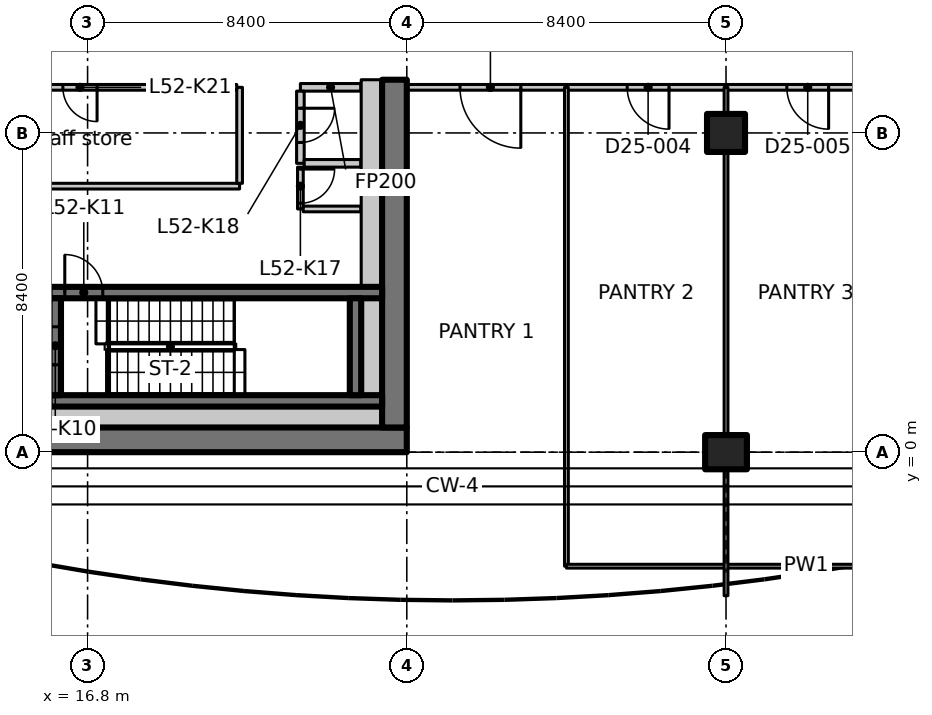
"""IFC4 building model, lengths in metres.
Left out: names, types, materials, properties, quantities, classifications, styles, units other than length and angle.
Written with IfcOpenShell. Run it as: python <this file> out.ifc"""

import sys

from ifc_helpers import new_model, si_unit, direction, frame, frame_2d, origin, origin_2d, place, context, subcontext, project, spatial, polyline, rectangle, outline, extrude, element, fill, save


model = new_model("IFC4")
c1 = context("Model", 3, precision=1e-05, world=origin(), true_north=direction((0.0, 1.0)))
c2 = subcontext(c1, "Body", "Model", "MODEL_VIEW")
j1 = project(units=[si_unit("LENGTHUNIT", "METRE"), si_unit("PLANEANGLEUNIT", "RADIAN")], contexts=[c1])
p1 = place(None, origin())
s1 = spatial("IfcSite", under=j1, at=p1, CompositionType="ELEMENT")
p2 = place(p1, origin())
s2 = spatial("IfcBuilding", under=s1, at=p2, CompositionType="ELEMENT")
p3 = place(p2, frame((0.0, 0.0, 206.4)))
s3 = spatial("IfcBuildingStorey", under=s2, at=p3, CompositionType="ELEMENT", Elevation=206.4)
p4 = place(p3, frame((33.6, 0.0, 0.0), z_axis=(0.0, 0.0, 1.0), x_axis=(0.0, 1.0, 0.0)))
e1 = element("IfcColumn", 1, at=p4, inside=s3, PredefinedType="COLUMN", context=c2, shape_type="SweptSolid", body=[
    extrude(rectangle(XDim=0.9, YDim=1.1, at=origin_2d()), origin(), (0.0, 0.0, 1.0), 4.2),
])
p5 = place(p3, frame((33.6, 8.4, 0.0), z_axis=(0.0, 0.0, 1.0), x_axis=(1.0, 0.0, 0.0)))
e2 = element("IfcColumn", 2, at=p5, inside=s3, PredefinedType="COLUMN", context=c2, shape_type="SweptSolid", body=[
    extrude(rectangle(XDim=1.0, YDim=1.0, at=origin_2d()), origin(), (0.0, 0.0, 1.0), 4.2),
])
p6 = place(p3, frame((7.286, 0.325, 0.0), z_axis=(0.0, 0.0, 1.0), x_axis=(1.0, 0.0, 0.0)))
e3 = element("IfcWall", 3, at=p6, inside=s3, PredefinedType="SHEAR", context=c2, shape_type="SweptSolid", body=[
    extrude(rectangle(XDim=17.914, YDim=0.65, at=frame_2d((8.957, 0.0))), origin(), (0.0, 0.0, 1.0), 4.2),
])
p7 = place(p3, frame((24.875, 0.65, 0.0), z_axis=(0.0, 0.0, 1.0), x_axis=(0.0, 1.0, 0.0)))
e4 = element("IfcWall", 4, at=p7, inside=s3, PredefinedType="SHEAR", context=c2, shape_type="SweptSolid", body=[
    extrude(rectangle(XDim=9.15, YDim=0.65, at=frame_2d((4.575, 0.0))), origin(), (0.0, 0.0, 1.0), 4.2),
])
p8 = place(p3, frame((15.8, 1.35, 0.0), z_axis=(0.0, 0.0, 1.0), x_axis=(1.0, 0.0, 0.0)))
e5 = element("IfcWall", 5, at=p8, inside=s3, PredefinedType="SHEAR", context=c2, shape_type="SweptSolid", body=[
    extrude(rectangle(XDim=8.75, YDim=0.3, at=frame_2d((4.375, 0.0))), origin(), (0.0, 0.0, 1.0), 4.2),
])
p9 = place(p3, frame((15.8, 4.2, 0.0), z_axis=(0.0, 0.0, 1.0), x_axis=(1.0, 0.0, 0.0)))
e6 = element("IfcWall", 6, at=p9, inside=s3, PredefinedType="SHEAR", context=c2, shape_type="SweptSolid", body=[
    extrude(rectangle(XDim=8.75, YDim=0.3, at=frame_2d((4.375, 0.0))), origin(), (0.0, 0.0, 1.0), 4.2),
])
p10 = place(p9, frame((0.4, 0.0, 0.0)))
e7 = element("IfcOpeningElement", 7, at=p10, cuts=e6, PredefinedType="OPENING", context=c2, shape_type="SweptSolid", body=[
    extrude(rectangle(XDim=1.0, YDim=2.1, at=frame_2d((0.5, 1.05))), frame((0.0, 0.16, 0.0), z_axis=(0.0, -1.0, 0.0), x_axis=(1.0, 0.0, 0.0)), (0.0, 0.0, 1.0), 0.32),
])
p11 = place(p3, frame((15.95, 1.5, 0.0), z_axis=(0.0, 0.0, 1.0), x_axis=(0.0, 1.0, 0.0)))
e8 = element("IfcWall", 8, at=p11, inside=s3, PredefinedType="SHEAR", context=c2, shape_type="SweptSolid", body=[
    extrude(rectangle(XDim=2.55, YDim=0.3, at=frame_2d((1.275, 0.0))), origin(), (0.0, 0.0, 1.0), 4.2),
])
p12 = place(p11, frame((0.8, 0.0, 0.0)))
e9 = element("IfcOpeningElement", 9, at=p12, cuts=e8, PredefinedType="OPENING", context=c2, shape_type="SweptSolid", body=[
    extrude(rectangle(XDim=1.0, YDim=2.1, at=frame_2d((0.5, 1.05))), frame((0.0, 0.16, 0.0), z_axis=(0.0, -1.0, 0.0), x_axis=(1.0, 0.0, 0.0)), (0.0, 0.0, 1.0), 0.32),
])
p13 = place(p3, frame((23.85, 1.5, 0.0), z_axis=(0.0, 0.0, 1.0), x_axis=(0.0, 1.0, 0.0)))
e10 = element("IfcWall", 10, at=p13, inside=s3, PredefinedType="SHEAR", context=c2, shape_type="SweptSolid", body=[
    extrude(rectangle(XDim=2.55, YDim=0.3, at=frame_2d((1.275, 0.0))), origin(), (0.0, 0.0, 1.0), 4.2),
])
p14 = place(p3, frame((23.988, 9.6, 0.0), z_axis=(0.0, 0.0, 1.0), x_axis=(-1.0, 0.0, 0.0)))
e11 = element("IfcWall", 11, at=p14, inside=s3, PredefinedType="PARTITIONING", context=c2, shape_type="SweptSolid", body=[
    extrude(rectangle(XDim=1.588, YDim=0.2, at=frame_2d((0.794, 0.0))), origin(), (0.0, 0.0, 1.0), 4.2),
])
p15 = place(p3, frame((22.4, 9.5, 0.0), z_axis=(0.0, 0.0, 1.0), x_axis=(0.0, -1.0, 0.0)))
e12 = element("IfcWall", 12, at=p15, inside=s3, PredefinedType="PARTITIONING", context=c2, shape_type="SweptSolid", body=[
    extrude(rectangle(XDim=1.9, YDim=0.2, at=frame_2d((0.95, 0.0))), origin(), (0.0, 0.0, 1.0), 4.2),
])
p16 = place(p15, frame((0.45, 0.0, 0.0)))
e13 = element("IfcOpeningElement", 13, at=p16, cuts=e12, PredefinedType="OPENING", context=c2, shape_type="SweptSolid", body=[
    extrude(rectangle(XDim=0.9, YDim=2.1, at=frame_2d((0.45, 1.05))), frame((0.0, 0.11, 0.0), z_axis=(0.0, -1.0, 0.0), x_axis=(1.0, 0.0, 0.0)), (0.0, 0.0, 1.0), 0.22),
])
p17 = place(p3, frame((22.5, 7.6, 0.0), z_axis=(0.0, 0.0, 1.0), x_axis=(1.0, 0.0, 0.0)))
e14 = element("IfcWall", 14, at=p17, inside=s3, PredefinedType="PARTITIONING", context=c2, shape_type="SweptSolid", body=[
    extrude(rectangle(XDim=1.488, YDim=0.2, at=frame_2d((0.744, 0.0))), origin(), (0.0, 0.0, 1.0), 4.2),
])
p18 = place(p3, frame((12.5, 7.0, 0.0), z_axis=(0.0, 0.0, 1.0), x_axis=(1.0, 0.0, 0.0)))
e15 = element("IfcWall", 15, at=p18, inside=s3, PredefinedType="PARTITIONING", context=c2, shape_type="SweptSolid", body=[
    extrude(rectangle(XDim=8.3, YDim=0.15, at=frame_2d((4.15, 0.0))), origin(), (0.0, 0.0, 1.0), 4.2),
])
p19 = place(p3, frame((20.8, 7.075, 0.0), z_axis=(0.0, 0.0, 1.0), x_axis=(0.0, 1.0, 0.0)))
e16 = element("IfcWall", 16, at=p19, inside=s3, PredefinedType="PARTITIONING", context=c2, shape_type="SweptSolid", body=[
    extrude(rectangle(XDim=2.525, YDim=0.15, at=frame_2d((1.263, 0.0))), origin(), (0.0, 0.0, 1.0), 4.2),
])
p20 = place(p3, frame((20.725, 9.6, 0.0), z_axis=(0.0, 0.0, 1.0), x_axis=(-1.0, 0.0, 0.0)))
e17 = element("IfcWall", 17, at=p20, inside=s3, PredefinedType="PARTITIONING", context=c2, shape_type="SweptSolid", body=[
    extrude(rectangle(XDim=8.225, YDim=0.15, at=frame_2d((4.113, 0.0))), origin(), (0.0, 0.0, 1.0), 4.2),
])
p21 = place(p20, frame((3.675, 0.0, 0.0)))
e18 = element("IfcOpeningElement", 18, at=p21, cuts=e17, PredefinedType="OPENING", context=c2, shape_type="SweptSolid", body=[
    extrude(rectangle(XDim=0.9, YDim=2.1, at=frame_2d((0.45, 1.05))), frame((0.0, 0.085, 0.0), z_axis=(0.0, -1.0, 0.0), x_axis=(1.0, 0.0, 0.0)), (0.0, 0.0, 1.0), 0.17),
])
p22 = place(p3, frame((22.4, 7.5, 0.0), z_axis=(0.0, 0.0, 1.0), x_axis=(0.0, -1.0, 0.0)))
e19 = element("IfcWall", 19, at=p22, inside=s3, PredefinedType="PARTITIONING", context=c2, shape_type="SweptSolid", body=[
    extrude(rectangle(XDim=1.1, YDim=0.15, at=frame_2d((0.55, 0.0))), origin(), (0.0, 0.0, 1.0), 4.2),
])
p23 = place(p22, frame((0.05, 0.0, 0.0)))
e20 = element("IfcOpeningElement", 20, at=p23, cuts=e19, PredefinedType="OPENING", context=c2, shape_type="SweptSolid", body=[
    extrude(rectangle(XDim=0.9, YDim=2.1, at=frame_2d((0.45, 1.05))), frame((0.0, 0.085, 0.0), z_axis=(0.0, -1.0, 0.0), x_axis=(1.0, 0.0, 0.0)), (0.0, 0.0, 1.0), 0.17),
])
p24 = place(p3, frame((22.475, 6.4, 0.0), z_axis=(0.0, 0.0, 1.0), x_axis=(1.0, 0.0, 0.0)))
e21 = element("IfcWall", 21, at=p24, inside=s3, PredefinedType="PARTITIONING", context=c2, shape_type="SweptSolid", body=[
    extrude(rectangle(XDim=1.513, YDim=0.15, at=frame_2d((0.756, 0.0))), origin(), (0.0, 0.0, 1.0), 4.2),
])
p25 = place(p3, frame((13.35, 0.925, 0.0), z_axis=(0.0, 0.0, 1.0), x_axis=(1.0, 0.0, 0.0)))
e22 = element("IfcWall", 22, at=p25, inside=s3, PredefinedType="PARTITIONING", context=c2, shape_type="SweptSolid", body=[
    extrude(rectangle(XDim=11.2, YDim=0.55, at=frame_2d((5.6, 0.0))), origin(), (0.0, 0.0, 1.0), 4.2),
])
p26 = place(p3, frame((24.275, 1.5, 0.0), z_axis=(0.0, 0.0, 1.0), x_axis=(0.0, 1.0, 0.0)))
e23 = element("IfcWall", 23, at=p26, inside=s3, PredefinedType="PARTITIONING", context=c2, shape_type="SweptSolid", body=[
    extrude(rectangle(XDim=2.55, YDim=0.55, at=frame_2d((1.275, 0.0))), origin(), (0.0, 0.0, 1.0), 4.2),
])
p27 = place(p3, frame((24.275, 4.35, 0.0), z_axis=(0.0, 0.0, 1.0), x_axis=(0.0, 1.0, 0.0)))
e24 = element("IfcWall", 24, at=p27, inside=s3, PredefinedType="PARTITIONING", context=c2, shape_type="SweptSolid", body=[
    extrude(rectangle(XDim=5.45, YDim=0.55, at=frame_2d((2.725, 0.0))), origin(), (0.0, 0.0, 1.0), 4.2),
])
p28 = place(p3, frame((29.4, 9.6, 0.0), z_axis=(0.0, 0.0, 1.0), x_axis=(-1.0, 0.0, 0.0)))
e25 = element("IfcWall", 25, at=p28, inside=s3, PredefinedType="PARTITIONING", context=c2, shape_type="SweptSolid", body=[
    extrude(rectangle(XDim=4.2, YDim=0.15, at=frame_2d((2.1, 0.0))), origin(), (0.0, 0.0, 1.0), 4.18),
])
p29 = place(p28, frame((1.2, 0.0, 0.0)))
e26 = element("IfcOpeningElement", 26, at=p29, cuts=e25, PredefinedType="OPENING", context=c2, shape_type="SweptSolid", body=[
    extrude(rectangle(XDim=1.6, YDim=2.1, at=frame_2d((0.8, 1.05))), frame((0.0, 0.085, 0.0), z_axis=(0.0, -1.0, 0.0), x_axis=(1.0, 0.0, 0.0)), (0.0, 0.0, 1.0), 0.17),
])
p30 = place(p3, frame((33.6, 9.6, 0.0), z_axis=(0.0, 0.0, 1.0), x_axis=(-1.0, 0.0, 0.0)))
e27 = element("IfcWall", 27, at=p30, inside=s3, PredefinedType="PARTITIONING", context=c2, shape_type="SweptSolid", body=[
    extrude(rectangle(XDim=4.2, YDim=0.15, at=frame_2d((2.1, 0.0))), origin(), (0.0, 0.0, 1.0), 4.18),
])
p31 = place(p30, frame((1.5, 0.0, 0.0)))
e28 = element("IfcOpeningElement", 28, at=p31, cuts=e27, PredefinedType="OPENING", context=c2, shape_type="SweptSolid", body=[
    extrude(rectangle(XDim=1.1, YDim=2.1, at=frame_2d((0.55, 1.05))), frame((0.0, 0.085, 0.0), z_axis=(0.0, -1.0, 0.0), x_axis=(1.0, 0.0, 0.0)), (0.0, 0.0, 1.0), 0.17),
])
p32 = place(p3, frame((37.8, 9.6, 0.0), z_axis=(0.0, 0.0, 1.0), x_axis=(-1.0, 0.0, 0.0)))
e29 = element("IfcWall", 29, at=p32, inside=s3, PredefinedType="PARTITIONING", context=c2, shape_type="SweptSolid", body=[
    extrude(rectangle(XDim=4.2, YDim=0.15, at=frame_2d((2.1, 0.0))), origin(), (0.0, 0.0, 1.0), 4.18),
])
p33 = place(p32, frame((1.5, 0.0, 0.0)))
e30 = element("IfcOpeningElement", 30, at=p33, cuts=e29, PredefinedType="OPENING", context=c2, shape_type="SweptSolid", body=[
    extrude(rectangle(XDim=1.1, YDim=2.1, at=frame_2d((0.55, 1.05))), frame((0.0, 0.085, 0.0), z_axis=(0.0, -1.0, 0.0), x_axis=(1.0, 0.0, 0.0)), (0.0, 0.0, 1.0), 0.17),
])
p34 = place(p3, frame((29.4, 9.6, 0.0), z_axis=(0.0, 0.0, 1.0), x_axis=(0.0, -1.0, 0.0)))
e31 = element("IfcWall", 31, at=p34, inside=s3, PredefinedType="PARTITIONING", context=c2, shape_type="SweptSolid", body=[
    extrude(outline(polyline([(0.0, 0.0), (12.6, 0.0), (12.6, 4.18), (10.05, 4.18), (10.048, 3.83), (9.152, 3.83), (9.15, 4.18), (0.0, 4.18), (0.0, 0.0)])), frame((0.0, 0.05, 0.0), z_axis=(0.0, -1.0, 0.0), x_axis=(1.0, 0.0, 0.0)), (0.0, 0.0, 1.0), 0.1),
])
p35 = place(p3, frame((29.4, -3.0, 0.0), z_axis=(0.0, 0.0, 1.0), x_axis=(1.0, 0.0, 0.0)))
e32 = element("IfcWall", 32, at=p35, inside=s3, PredefinedType="PARTITIONING", context=c2, shape_type="SweptSolid", body=[
    extrude(rectangle(XDim=4.2, YDim=0.1, at=frame_2d((2.1, 0.0))), origin(), (0.0, 0.0, 1.0), 3.83),
])
p36 = place(p3, frame((33.6, -3.0, 0.0), z_axis=(0.0, 0.0, 1.0), x_axis=(1.0, 0.0, 0.0)))
e33 = element("IfcWall", 33, at=p36, inside=s3, PredefinedType="PARTITIONING", context=c2, shape_type="SweptSolid", body=[
    extrude(rectangle(XDim=4.216, YDim=0.1, at=frame_2d((2.108, 0.0))), origin(), (0.0, 0.0, 1.0), 3.83),
])
p37 = place(p3, frame((33.6, 9.6, 0.0), z_axis=(0.0, 0.0, 1.0), x_axis=(0.0, -1.0, 0.0)))
e34 = element("IfcWall", 34, at=p37, inside=s3, PredefinedType="PARTITIONING", context=c2, shape_type="SweptSolid", body=[
    extrude(rectangle(XDim=0.68, YDim=0.1, at=frame_2d((0.34, 0.0))), origin(), (0.0, 0.0, 1.0), 4.18),
])
p38 = place(p3, frame((33.6, 7.88, 0.0), z_axis=(0.0, 0.0, 1.0), x_axis=(0.0, -1.0, 0.0)))
e35 = element("IfcWall", 35, at=p38, inside=s3, PredefinedType="PARTITIONING", context=c2, shape_type="SweptSolid", body=[
    extrude(rectangle(XDim=7.41, YDim=0.1, at=frame_2d((3.705, 0.0))), origin(), (0.0, 0.0, 1.0), 4.18),
])
p39 = place(p3, frame((33.6, -0.47, 0.0), z_axis=(0.0, 0.0, 1.0), x_axis=(0.0, -1.0, 0.0)))
e36 = element("IfcWall", 36, at=p39, inside=s3, PredefinedType="PARTITIONING", context=c2, shape_type="SweptSolid", body=[
    extrude(rectangle(XDim=3.307, YDim=0.1, at=frame_2d((1.653, 0.0))), origin(), (0.0, 0.0, 1.0), 3.83),
])
p40 = place(p12, origin())
e37 = element("IfcDoor", 37, at=p40, inside=s3, OperationType="SINGLE_SWING_LEFT", PredefinedType="DOOR", context=c2, shape_type="SweptSolid", body=[
    extrude(rectangle(XDim=1.0, YDim=2.1, at=frame_2d((0.5, 1.05))), frame((0.0, 0.025, 0.0), z_axis=(0.0, -1.0, 0.0), x_axis=(1.0, 0.0, 0.0)), (0.0, 0.0, 1.0), 0.05),
])
fill(e9, e37)
p41 = place(p10, origin())
e38 = element("IfcDoor", 38, at=p41, inside=s3, OperationType="SINGLE_SWING_RIGHT", PredefinedType="DOOR", context=c2, shape_type="SweptSolid", body=[
    extrude(rectangle(XDim=1.0, YDim=2.1, at=frame_2d((0.5, 1.05))), frame((0.0, 0.025, 0.0), z_axis=(0.0, -1.0, 0.0), x_axis=(1.0, 0.0, 0.0)), (0.0, 0.0, 1.0), 0.05),
])
fill(e7, e38)
p42 = place(p23, origin())
e39 = element("IfcDoor", 39, at=p42, inside=s3, OperationType="SINGLE_SWING_RIGHT", PredefinedType="DOOR", context=c2, shape_type="SweptSolid", body=[
    extrude(rectangle(XDim=0.9, YDim=2.1, at=frame_2d((0.45, 1.05))), frame((0.0, 0.025, 0.0), z_axis=(0.0, -1.0, 0.0), x_axis=(1.0, 0.0, 0.0)), (0.0, 0.0, 1.0), 0.05),
])
fill(e20, e39)
p43 = place(p16, origin())
e40 = element("IfcDoor", 40, at=p43, inside=s3, OperationType="SINGLE_SWING_LEFT", PredefinedType="DOOR", context=c2, shape_type="SweptSolid", body=[
    extrude(rectangle(XDim=0.9, YDim=2.1, at=frame_2d((0.45, 1.05))), frame((0.0, 0.025, 0.0), z_axis=(0.0, -1.0, 0.0), x_axis=(1.0, 0.0, 0.0)), (0.0, 0.0, 1.0), 0.05),
])
fill(e13, e40)
p44 = place(p21, origin())
e41 = element("IfcDoor", 41, at=p44, inside=s3, OperationType="SINGLE_SWING_RIGHT", PredefinedType="DOOR", context=c2, shape_type="SweptSolid", body=[
    extrude(rectangle(XDim=0.9, YDim=2.1, at=frame_2d((0.45, 1.05))), frame((0.0, 0.025, 0.0), z_axis=(0.0, -1.0, 0.0), x_axis=(1.0, 0.0, 0.0)), (0.0, 0.0, 1.0), 0.05),
])
fill(e18, e41)
p45 = place(p29, origin())
e42 = element("IfcDoor", 42, at=p45, inside=s3, OperationType="DOUBLE_DOOR_SINGLE_SWING", PredefinedType="DOOR", context=c2, shape_type="SweptSolid", body=[
    extrude(rectangle(XDim=1.6, YDim=2.1, at=frame_2d((0.8, 1.05))), frame((0.0, 0.025, 0.0), z_axis=(0.0, -1.0, 0.0), x_axis=(1.0, 0.0, 0.0)), (0.0, 0.0, 1.0), 0.05),
])
fill(e26, e42)
p46 = place(p31, origin())
e43 = element("IfcDoor", 43, at=p46, inside=s3, OperationType="SINGLE_SWING_LEFT", PredefinedType="DOOR", context=c2, shape_type="SweptSolid", body=[
    extrude(rectangle(XDim=1.1, YDim=2.1, at=frame_2d((0.55, 1.05))), frame((0.0, 0.025, 0.0), z_axis=(0.0, -1.0, 0.0), x_axis=(1.0, 0.0, 0.0)), (0.0, 0.0, 1.0), 0.05),
])
fill(e28, e43)
p47 = place(p33, origin())
e44 = element("IfcDoor", 44, at=p47, inside=s3, OperationType="SINGLE_SWING_LEFT", PredefinedType="DOOR", context=c2, shape_type="SweptSolid", body=[
    extrude(rectangle(XDim=1.1, YDim=2.1, at=frame_2d((0.55, 1.05))), frame((0.0, 0.025, 0.0), z_axis=(0.0, -1.0, 0.0), x_axis=(1.0, 0.0, 0.0)), (0.0, 0.0, 1.0), 0.05),
])
fill(e30, e44)
save(model, sys.argv[1])
